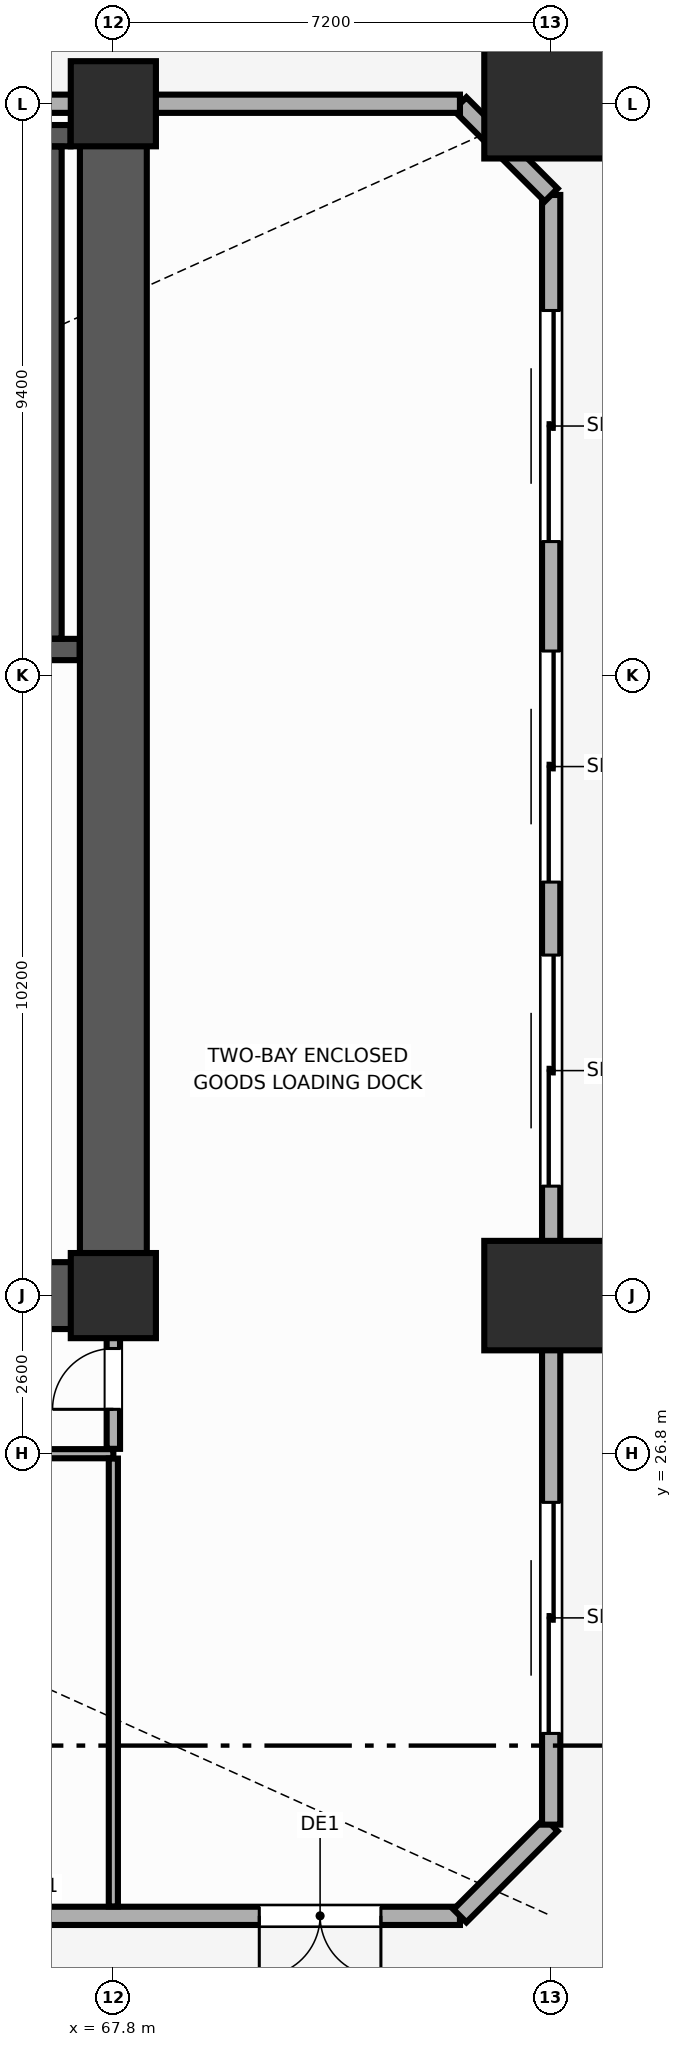
"""IFC4 building model, lengths in metres.
Left out: names, types, materials, properties, quantities, classifications, styles, units other than length and angle.
Written with IfcOpenShell. Run it as: python <this file> out.ifc"""

import sys

from ifc_helpers import new_model, si_unit, direction, frame, frame_2d, origin, origin_2d, place, context, subcontext, project, spatial, rectangle, extrude, element, fill, save


model = new_model("IFC4")
c1 = context("Model", 3, precision=1e-05, world=origin(), true_north=direction((0.0, 1.0)))
c2 = subcontext(c1, "Body", "Model", "MODEL_VIEW")
j1 = project(units=[si_unit("LENGTHUNIT", "METRE"), si_unit("PLANEANGLEUNIT", "RADIAN")], contexts=[c1])
p1 = place(None, origin())
s1 = spatial("IfcSite", under=j1, at=p1, CompositionType="ELEMENT")
p2 = place(p1, origin())
s2 = spatial("IfcBuilding", under=s1, at=p2, CompositionType="ELEMENT")
p3 = place(p2, origin())
s3 = spatial("IfcBuildingStorey", under=s2, at=p3, CompositionType="ELEMENT", Elevation=0.0)
for number, where, z_axis, x_axis in (
    (1, (75.0, 29.4, 0.0), (0.0, 0.0, 1.0), (1.0, 0.0, 0.0)),
    (2, (75.0, 49.0, 0.0), (0.0, 0.0, 1.0), (1.0, 0.0, 0.0)),
):
    element("IfcColumn", number, at=place(p3, frame(where, z_axis=z_axis, x_axis=x_axis)), inside=s3, PredefinedType="USERDEFINED", context=c2, shape_type="SweptSolid", body=[
        extrude(rectangle(XDim=2.2, YDim=1.8, at=origin_2d()), origin(), (0.0, 0.0, 1.0), 7.68),
    ])
for number, where, z_axis, x_axis in (
    (3, (67.8, 29.4, 0.0), (0.0, 0.0, 1.0), (1.0, 0.0, 0.0)),
    (4, (67.8, 49.0, 0.0), (0.0, 0.0, 1.0), (1.0, 0.0, 0.0)),
):
    element("IfcColumn", number, at=place(p3, frame(where, z_axis=z_axis, x_axis=x_axis)), inside=s3, PredefinedType="COLUMN", context=c2, shape_type="SweptSolid", body=[
        extrude(rectangle(XDim=1.4, YDim=1.4, at=origin_2d()), origin(), (0.0, 0.0, 1.0), 7.68),
    ])
p4 = place(p3, frame((73.5, 19.2, 0.0), z_axis=(0.0, 0.0, 1.0), x_axis=(-1.0, 0.0, 0.0)))
e5 = element("IfcWall", 5, at=p4, inside=s3, PredefinedType="SOLIDWALL", context=c2, shape_type="SweptSolid", body=[
    extrude(rectangle(XDim=13.905, YDim=0.3, at=frame_2d((6.953, 0.0))), origin(), (0.0, 0.0, 1.0), 7.68),
])
p5 = place(p4, frame((9.7, 0.0, 0.0)))
e6 = element("IfcOpeningElement", 6, at=p5, cuts=e5, PredefinedType="OPENING", context=c2, shape_type="SweptSolid", body=[
    extrude(rectangle(XDim=2.0, YDim=2.4, at=frame_2d((1.0, 1.2))), frame((0.0, 0.16, 0.0), z_axis=(0.0, -1.0, 0.0), x_axis=(1.0, 0.0, 0.0)), (0.0, 0.0, 1.0), 0.32),
])
p6 = place(p4, frame((1.3, 0.0, 0.0)))
e7 = element("IfcOpeningElement", 7, at=p6, cuts=e5, PredefinedType="OPENING", context=c2, shape_type="SweptSolid", body=[
    extrude(rectangle(XDim=2.0, YDim=2.4, at=frame_2d((1.0, 1.2))), frame((0.0, 0.16, 0.0), z_axis=(0.0, -1.0, 0.0), x_axis=(1.0, 0.0, 0.0)), (0.0, 0.0, 1.0), 0.32),
])
p7 = place(p3, frame((73.5, 19.2, 0.0), z_axis=(0.0, 0.0, 1.0), x_axis=(0.707106781187, 0.707106781187, 0.0)))
e8 = element("IfcWall", 8, at=p7, inside=s3, PredefinedType="SOLIDWALL", context=c2, shape_type="SweptSolid", body=[
    extrude(rectangle(XDim=2.121, YDim=0.3, at=frame_2d((1.061, 0.0))), origin(), (0.0, 0.0, 1.0), 7.68),
])
p8 = place(p3, frame((75.0, 20.7, 0.0), z_axis=(0.0, 0.0, 1.0), x_axis=(0.0, 1.0, 0.0)))
e9 = element("IfcWall", 9, at=p8, inside=s3, PredefinedType="SOLIDWALL", context=c2, shape_type="SweptSolid", body=[
    extrude(rectangle(XDim=26.8, YDim=0.3, at=frame_2d((13.4, 0.0))), origin(), (0.0, 0.0, 1.0), 5.4),
])
p9 = place(p8, frame((1.5, 0.0, 0.0)))
e10 = element("IfcOpeningElement", 10, at=p9, cuts=e9, PredefinedType="OPENING", context=c2, shape_type="SweptSolid", body=[
    extrude(rectangle(XDim=3.8, YDim=4.2, at=frame_2d((1.9, 2.1))), frame((0.0, 0.16, 0.0), z_axis=(0.0, -1.0, 0.0), x_axis=(1.0, 0.0, 0.0)), (0.0, 0.0, 1.0), 0.32),
])
p10 = place(p8, frame((10.5, 0.0, 0.0)))
e11 = element("IfcOpeningElement", 11, at=p10, cuts=e9, PredefinedType="OPENING", context=c2, shape_type="SweptSolid", body=[
    extrude(rectangle(XDim=3.8, YDim=4.2, at=frame_2d((1.9, 2.1))), frame((0.0, 0.16, 0.0), z_axis=(0.0, -1.0, 0.0), x_axis=(1.0, 0.0, 0.0)), (0.0, 0.0, 1.0), 0.32),
])
p11 = place(p8, frame((15.5, 0.0, 0.0)))
e12 = element("IfcOpeningElement", 12, at=p11, cuts=e9, PredefinedType="OPENING", context=c2, shape_type="SweptSolid", body=[
    extrude(rectangle(XDim=3.8, YDim=4.2, at=frame_2d((1.9, 2.1))), frame((0.0, 0.16, 0.0), z_axis=(0.0, -1.0, 0.0), x_axis=(1.0, 0.0, 0.0)), (0.0, 0.0, 1.0), 0.32),
])
p12 = place(p8, frame((21.1, 0.0, 0.0)))
e13 = element("IfcOpeningElement", 13, at=p12, cuts=e9, PredefinedType="OPENING", context=c2, shape_type="SweptSolid", body=[
    extrude(rectangle(XDim=3.8, YDim=4.2, at=frame_2d((1.9, 2.1))), frame((0.0, 0.16, 0.0), z_axis=(0.0, -1.0, 0.0), x_axis=(1.0, 0.0, 0.0)), (0.0, 0.0, 1.0), 0.32),
])
p13 = place(p3, frame((75.0, 47.5, 0.0), z_axis=(0.0, 0.0, 1.0), x_axis=(-0.707106781187, 0.707106781187, 0.0)))
e14 = element("IfcWall", 14, at=p13, inside=s3, PredefinedType="SOLIDWALL", context=c2, shape_type="SweptSolid", body=[
    extrude(rectangle(XDim=2.121, YDim=0.3, at=frame_2d((1.061, 0.0))), origin(), (0.0, 0.0, 1.0), 7.68),
])
p14 = place(p3, frame((73.5, 49.0, 0.0), z_axis=(0.0, 0.0, 1.0), x_axis=(-1.0, 0.0, 0.0)))
e15 = element("IfcWall", 15, at=p14, inside=s3, PredefinedType="SOLIDWALL", context=c2, shape_type="SweptSolid", body=[
    extrude(rectangle(XDim=63.0, YDim=0.3, at=frame_2d((31.5, 0.0))), origin(), (0.0, 0.0, 1.0), 5.4),
])
p15 = place(p14, frame((46.15, 0.0, 0.0)))
e16 = element("IfcOpeningElement", 16, at=p15, cuts=e15, PredefinedType="OPENING", context=c2, shape_type="SweptSolid", body=[
    extrude(rectangle(XDim=2.0, YDim=2.4, at=frame_2d((1.0, 1.2))), frame((0.0, 0.16, 0.0), z_axis=(0.0, -1.0, 0.0), x_axis=(1.0, 0.0, 0.0)), (0.0, 0.0, 1.0), 0.32),
])
p16 = place(p14, frame((37.6, 0.0, 0.0)))
e17 = element("IfcOpeningElement", 17, at=p16, cuts=e15, PredefinedType="OPENING", context=c2, shape_type="SweptSolid", body=[
    extrude(rectangle(XDim=2.0, YDim=2.4, at=frame_2d((1.0, 1.2))), frame((0.0, 0.16, 0.0), z_axis=(0.0, -1.0, 0.0), x_axis=(1.0, 0.0, 0.0)), (0.0, 0.0, 1.0), 0.32),
])
p17 = place(p14, frame((16.65, 0.0, 0.0)))
e18 = element("IfcOpeningElement", 18, at=p17, cuts=e15, PredefinedType="OPENING", context=c2, shape_type="SweptSolid", body=[
    extrude(rectangle(XDim=2.0, YDim=2.4, at=frame_2d((1.0, 1.2))), frame((0.0, 0.16, 0.0), z_axis=(0.0, -1.0, 0.0), x_axis=(1.0, 0.0, 0.0)), (0.0, 0.0, 1.0), 0.32),
])
p18 = place(p3, frame((67.8, 29.4, 0.0), z_axis=(0.0, 0.0, 1.0), x_axis=(0.0, 1.0, 0.0)))
e19 = element("IfcWall", 19, at=p18, inside=s3, PredefinedType="SHEAR", context=c2, shape_type="SweptSolid", body=[
    extrude(rectangle(XDim=19.2, YDim=1.1, at=frame_2d((9.6, 0.0))), origin(), (0.0, 0.0, 1.0), 7.68),
])
p19 = place(p3, frame((60.4, 29.4, 0.0), z_axis=(0.0, 0.0, 1.0), x_axis=(1.0, 0.0, 0.0)))
e20 = element("IfcWall", 20, at=p19, inside=s3, PredefinedType="SHEAR", context=c2, shape_type="SweptSolid", body=[
    extrude(rectangle(XDim=6.845, YDim=1.1, at=frame_2d((3.423, 0.0))), origin(), (0.0, 0.0, 1.0), 7.68),
])
p20 = place(p3, frame((63.145, 40.025, 0.0), z_axis=(0.0, 0.0, 1.0), x_axis=(1.0, 0.0, 0.0)))
e21 = element("IfcWall", 21, at=p20, inside=s3, PredefinedType="SHEAR", context=c2, shape_type="SweptSolid", body=[
    extrude(rectangle(XDim=4.1, YDim=0.35, at=frame_2d((2.05, 0.0))), origin(), (0.0, 0.0, 1.0), 7.68),
])
p21 = place(p20, frame((1.24, 0.0, 0.0)))
e22 = element("IfcOpeningElement", 22, at=p21, cuts=e21, PredefinedType="OPENING", context=c2, shape_type="SweptSolid", body=[
    extrude(rectangle(XDim=1.15, YDim=2.15, at=frame_2d((0.575, 1.075))), frame((0.0, 0.185, 0.0), z_axis=(0.0, -1.0, 0.0), x_axis=(1.0, 0.0, 0.0)), (0.0, 0.0, 1.0), 0.37),
])
p22 = place(p3, frame((63.145, 48.475, 0.0), z_axis=(0.0, 0.0, 1.0), x_axis=(1.0, 0.0, 0.0)))
e23 = element("IfcWall", 23, at=p22, inside=s3, PredefinedType="SHEAR", context=c2, shape_type="SweptSolid", body=[
    extrude(rectangle(XDim=3.95, YDim=0.35, at=frame_2d((1.975, 0.0))), origin(), (0.0, 0.0, 1.0), 7.68),
])
p23 = place(p3, frame((66.775, 40.205, 0.0), z_axis=(0.0, 0.0, 1.0), x_axis=(0.0, 1.0, 0.0)))
e24 = element("IfcWall", 24, at=p23, inside=s3, PredefinedType="SHEAR", context=c2, shape_type="SweptSolid", body=[
    extrude(rectangle(XDim=8.09, YDim=0.35, at=frame_2d((4.045, 0.0))), origin(), (0.0, 0.0, 1.0), 7.68),
])
p24 = place(p3, frame((49.88, 26.8, 0.0), z_axis=(0.0, 0.0, 1.0), x_axis=(1.0, 0.0, 0.0)))
e25 = element("IfcWall", 25, at=p24, inside=s3, PredefinedType="PARTITIONING", context=c2, shape_type="SweptSolid", body=[
    extrude(rectangle(XDim=17.92, YDim=0.15, at=frame_2d((8.96, 0.0))), origin(), (0.0, 0.0, 1.0), 7.68),
])
p25 = place(p24, frame((7.12, 0.0, 0.0)))
e26 = element("IfcOpeningElement", 26, at=p25, cuts=e25, PredefinedType="OPENING", context=c2, shape_type="SweptSolid", body=[
    extrude(rectangle(XDim=1.0, YDim=2.15, at=frame_2d((0.5, 1.075))), frame((0.0, 0.085, 0.0), z_axis=(0.0, -1.0, 0.0), x_axis=(1.0, 0.0, 0.0)), (0.0, 0.0, 1.0), 0.17),
])
p26 = place(p3, frame((67.8, 19.355, 0.0), z_axis=(0.0, 0.0, 1.0), x_axis=(0.0, 1.0, 0.0)))
e27 = element("IfcWall", 27, at=p26, inside=s3, PredefinedType="PARTITIONING", context=c2, shape_type="SweptSolid", body=[
    extrude(rectangle(XDim=7.365, YDim=0.15, at=frame_2d((3.683, 0.0))), origin(), (0.0, 0.0, 1.0), 7.68),
])
p27 = place(p3, frame((67.8, 26.88, 0.0), z_axis=(0.0, 0.0, 1.0), x_axis=(0.0, 1.0, 0.0)))
e28 = element("IfcWall", 28, at=p27, inside=s3, PredefinedType="PARTITIONING", context=c2, shape_type="SweptSolid", body=[
    extrude(rectangle(XDim=2.51, YDim=0.22, at=frame_2d((1.255, 0.0))), origin(), (0.0, 0.0, 1.0), 7.68),
])
p28 = place(p27, frame((0.65, 0.0, 0.0)))
e29 = element("IfcOpeningElement", 29, at=p28, cuts=e28, PredefinedType="OPENING", context=c2, shape_type="SweptSolid", body=[
    extrude(rectangle(XDim=1.0, YDim=2.15, at=frame_2d((0.5, 1.075))), frame((0.0, 0.12, 0.0), z_axis=(0.0, -1.0, 0.0), x_axis=(1.0, 0.0, 0.0)), (0.0, 0.0, 1.0), 0.24),
])
p29 = place(p6, origin())
e30 = element("IfcDoor", 30, at=p29, inside=s3, OperationType="DOUBLE_DOOR_SINGLE_SWING", PredefinedType="DOOR", context=c2, shape_type="SweptSolid", body=[
    extrude(rectangle(XDim=2.0, YDim=2.4, at=frame_2d((1.0, 1.2))), frame((0.0, 0.025, 0.0), z_axis=(0.0, -1.0, 0.0), x_axis=(1.0, 0.0, 0.0)), (0.0, 0.0, 1.0), 0.05),
])
fill(e7, e30)
p30 = place(p9, origin())
e31 = element("IfcDoor", 31, at=p30, inside=s3, OperationType="SINGLE_SWING_LEFT", PredefinedType="GATE", context=c2, shape_type="SweptSolid", body=[
    extrude(rectangle(XDim=3.8, YDim=4.2, at=frame_2d((1.9, 2.1))), frame((0.0, 0.025, 0.0), z_axis=(0.0, -1.0, 0.0), x_axis=(1.0, 0.0, 0.0)), (0.0, 0.0, 1.0), 0.05),
])
fill(e10, e31)
p31 = place(p10, origin())
e32 = element("IfcDoor", 32, at=p31, inside=s3, OperationType="SINGLE_SWING_LEFT", PredefinedType="GATE", context=c2, shape_type="SweptSolid", body=[
    extrude(rectangle(XDim=3.8, YDim=4.2, at=frame_2d((1.9, 2.1))), frame((0.0, 0.025, 0.0), z_axis=(0.0, -1.0, 0.0), x_axis=(1.0, 0.0, 0.0)), (0.0, 0.0, 1.0), 0.05),
])
fill(e11, e32)
p32 = place(p11, origin())
e33 = element("IfcDoor", 33, at=p32, inside=s3, OperationType="SINGLE_SWING_LEFT", PredefinedType="GATE", context=c2, shape_type="SweptSolid", body=[
    extrude(rectangle(XDim=3.8, YDim=4.2, at=frame_2d((1.9, 2.1))), frame((0.0, 0.025, 0.0), z_axis=(0.0, -1.0, 0.0), x_axis=(1.0, 0.0, 0.0)), (0.0, 0.0, 1.0), 0.05),
])
fill(e12, e33)
p33 = place(p12, origin())
e34 = element("IfcDoor", 34, at=p33, inside=s3, OperationType="SINGLE_SWING_LEFT", PredefinedType="GATE", context=c2, shape_type="SweptSolid", body=[
    extrude(rectangle(XDim=3.8, YDim=4.2, at=frame_2d((1.9, 2.1))), frame((0.0, 0.025, 0.0), z_axis=(0.0, -1.0, 0.0), x_axis=(1.0, 0.0, 0.0)), (0.0, 0.0, 1.0), 0.05),
])
fill(e13, e34)
p34 = place(p28, origin())
e35 = element("IfcDoor", 35, at=p34, inside=s3, OperationType="SINGLE_SWING_LEFT", PredefinedType="DOOR", context=c2, shape_type="SweptSolid", body=[
    extrude(rectangle(XDim=1.0, YDim=2.15, at=frame_2d((0.5, 1.075))), frame((0.0, 0.025, 0.0), z_axis=(0.0, -1.0, 0.0), x_axis=(1.0, 0.0, 0.0)), (0.0, 0.0, 1.0), 0.05),
])
fill(e29, e35)
save(model, sys.argv[1])
